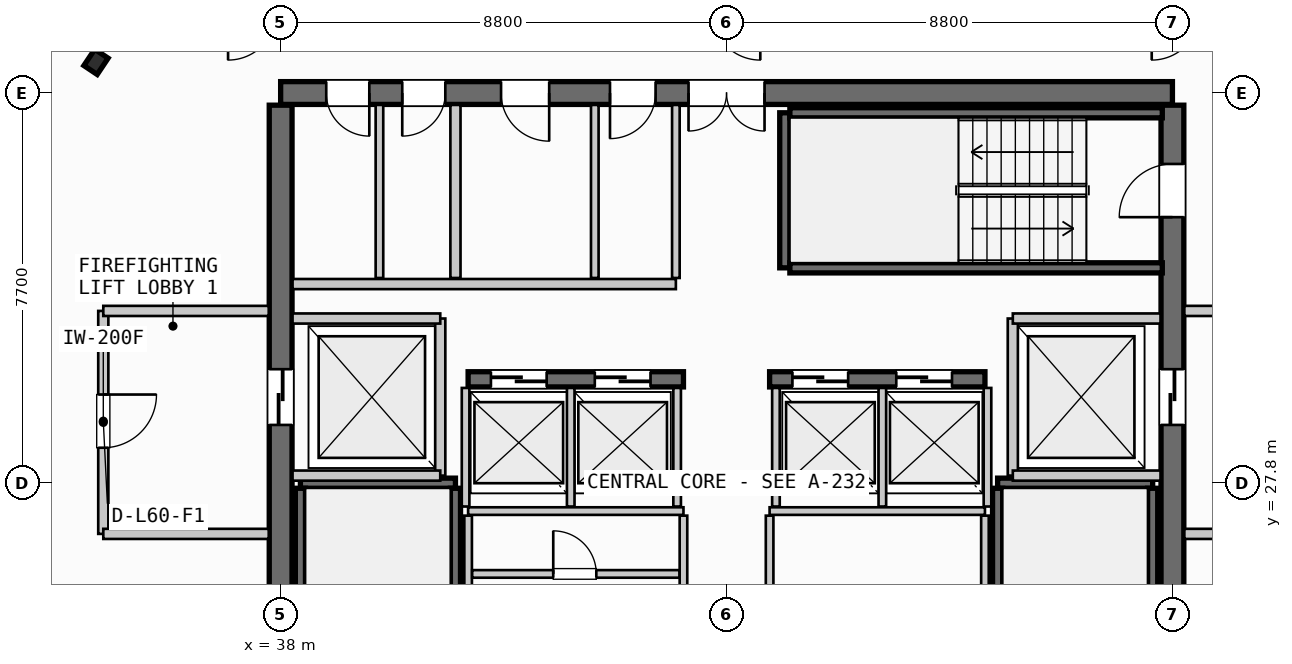
"""IFC4 building model, lengths in metres.
Left out: names, types, materials, properties, quantities, classifications, styles, units other than length and angle.
Written with IfcOpenShell. Run it as: python <this file> out.ifc"""

import sys

from ifc_helpers import new_model, si_unit, direction, frame, frame_2d, origin, origin_2d, place, context, subcontext, project, spatial, rectangle, i_section, extrude, source, transform, mapped, element, fill, save


model = new_model("IFC4")
c1 = context("Model", 3, precision=1e-05, world=origin(), true_north=direction((0.0, 1.0)))
c2 = subcontext(c1, "Body", "Model", "MODEL_VIEW")
j1 = project(units=[si_unit("LENGTHUNIT", "METRE"), si_unit("PLANEANGLEUNIT", "RADIAN")], contexts=[c1])
p1 = place(None, origin())
s1 = spatial("IfcSite", under=j1, at=p1, CompositionType="ELEMENT")
p2 = place(p1, origin())
s2 = spatial("IfcBuilding", under=s1, at=p2, CompositionType="ELEMENT")
p3 = place(p2, frame((0.0, 0.0, 231.85)))
s3 = spatial("IfcBuildingStorey", under=s2, at=p3, CompositionType="ELEMENT", Elevation=231.85)
p4 = place(p3, frame((55.6, 35.5, 0.0), z_axis=(0.0, 0.0, 1.0), x_axis=(-1.0, 0.0, 0.0)))
e1 = element("IfcWall", 1, at=p4, inside=s3, PredefinedType="SHEAR", context=c2, shape_type="SweptSolid", body=[
    extrude(rectangle(XDim=17.6, YDim=0.45, at=frame_2d((8.8, 0.0))), origin(), (0.0, 0.0, 1.0), 3.21),
])
p5 = place(p4, frame((8.05, 0.0, 0.0)))
e2 = element("IfcOpeningElement", 2, at=p5, cuts=e1, PredefinedType="OPENING", context=c2, shape_type="SweptSolid", body=[
    extrude(rectangle(XDim=1.5, YDim=2.2, at=frame_2d((0.75, 1.1))), frame((0.0, 0.235, 0.0), z_axis=(0.0, -1.0, 0.0), x_axis=(1.0, 0.0, 0.0)), (0.0, 0.0, 1.0), 0.47),
])
p6 = place(p4, frame((15.85, 0.0, 0.0)))
e3 = element("IfcOpeningElement", 3, at=p6, cuts=e1, PredefinedType="OPENING", context=c2, shape_type="SweptSolid", body=[
    extrude(rectangle(XDim=0.85, YDim=2.15, at=frame_2d((0.425, 1.075))), frame((0.0, 0.235, 0.0), z_axis=(0.0, -1.0, 0.0), x_axis=(1.0, 0.0, 0.0)), (0.0, 0.0, 1.0), 0.47),
])
p7 = place(p4, frame((14.35, 0.0, 0.0)))
e4 = element("IfcOpeningElement", 4, at=p7, cuts=e1, PredefinedType="OPENING", context=c2, shape_type="SweptSolid", body=[
    extrude(rectangle(XDim=0.85, YDim=2.15, at=frame_2d((0.425, 1.075))), frame((0.0, 0.235, 0.0), z_axis=(0.0, -1.0, 0.0), x_axis=(1.0, 0.0, 0.0)), (0.0, 0.0, 1.0), 0.47),
])
p8 = place(p4, frame((12.3, 0.0, 0.0)))
e5 = element("IfcOpeningElement", 5, at=p8, cuts=e1, PredefinedType="OPENING", context=c2, shape_type="SweptSolid", body=[
    extrude(rectangle(XDim=0.95, YDim=2.15, at=frame_2d((0.475, 1.075))), frame((0.0, 0.235, 0.0), z_axis=(0.0, -1.0, 0.0), x_axis=(1.0, 0.0, 0.0)), (0.0, 0.0, 1.0), 0.47),
])
p9 = place(p4, frame((10.2, 0.0, 0.0)))
e6 = element("IfcOpeningElement", 6, at=p9, cuts=e1, PredefinedType="OPENING", context=c2, shape_type="SweptSolid", body=[
    extrude(rectangle(XDim=0.9, YDim=2.15, at=frame_2d((0.45, 1.075))), frame((0.0, 0.235, 0.0), z_axis=(0.0, -1.0, 0.0), x_axis=(1.0, 0.0, 0.0)), (0.0, 0.0, 1.0), 0.47),
])
p10 = place(p3, frame((38.0, 35.26, 0.0), z_axis=(0.0, 0.0, 1.0), x_axis=(0.0, -1.0, 0.0)))
e7 = element("IfcWall", 7, at=p10, inside=s3, PredefinedType="SHEAR", context=c2, shape_type="SweptSolid", body=[
    extrude(rectangle(XDim=14.92, YDim=0.45, at=frame_2d((7.46, 0.0))), origin(), (0.0, 0.0, 1.0), 3.21),
])
p11 = place(p10, frame((5.21, 0.0, 0.0)))
e8 = element("IfcOpeningElement", 8, at=p11, cuts=e7, PredefinedType="OPENING", context=c2, shape_type="SweptSolid", body=[
    extrude(rectangle(XDim=1.1, YDim=2.2, at=frame_2d((0.55, 1.1))), frame((0.0, 0.235, 0.0), z_axis=(0.0, -1.0, 0.0), x_axis=(1.0, 0.0, 0.0)), (0.0, 0.0, 1.0), 0.47),
])
p12 = place(p3, frame((55.6, 20.34, 0.0), z_axis=(0.0, 0.0, 1.0), x_axis=(0.0, 1.0, 0.0)))
e9 = element("IfcWall", 9, at=p12, inside=s3, PredefinedType="SHEAR", context=c2, shape_type="SweptSolid", body=[
    extrude(rectangle(XDim=14.92, YDim=0.45, at=frame_2d((7.46, 0.0))), origin(), (0.0, 0.0, 1.0), 3.21),
])
p13 = place(p12, frame((12.71, 0.0, 0.0)))
e10 = element("IfcOpeningElement", 10, at=p13, cuts=e9, PredefinedType="OPENING", context=c2, shape_type="SweptSolid", body=[
    extrude(rectangle(XDim=1.05, YDim=2.15, at=frame_2d((0.525, 1.075))), frame((0.0, 0.235, 0.0), z_axis=(0.0, -1.0, 0.0), x_axis=(1.0, 0.0, 0.0)), (0.0, 0.0, 1.0), 0.47),
])
p14 = place(p12, frame((8.61, 0.0, 0.0)))
e11 = element("IfcOpeningElement", 11, at=p14, cuts=e9, PredefinedType="OPENING", context=c2, shape_type="SweptSolid", body=[
    extrude(rectangle(XDim=1.1, YDim=2.2, at=frame_2d((0.55, 1.1))), frame((0.0, 0.235, 0.0), z_axis=(0.0, -1.0, 0.0), x_axis=(1.0, 0.0, 0.0)), (0.0, 0.0, 1.0), 0.47),
])
p15 = place(p3, frame((41.7, 29.85, 0.0), z_axis=(0.0, 0.0, 1.0), x_axis=(1.0, 0.0, 0.0)))
e12 = element("IfcWall", 12, at=p15, inside=s3, PredefinedType="SHEAR", context=c2, shape_type="SweptSolid", body=[
    extrude(rectangle(XDim=4.25, YDim=0.3, at=frame_2d((2.125, 0.0))), origin(), (0.0, 0.0, 1.0), 3.21),
])
p16 = place(p15, frame((0.45, 0.0, 0.0)))
e13 = element("IfcOpeningElement", 13, at=p16, cuts=e12, PredefinedType="OPENING", context=c2, shape_type="SweptSolid", body=[
    extrude(rectangle(XDim=1.1, YDim=2.2, at=frame_2d((0.55, 1.1))), frame((0.0, 0.16, 0.0), z_axis=(0.0, -1.0, 0.0), x_axis=(1.0, 0.0, 0.0)), (0.0, 0.0, 1.0), 0.32),
])
p17 = place(p15, frame((2.5, 0.0, 0.0)))
e14 = element("IfcOpeningElement", 14, at=p17, cuts=e12, PredefinedType="OPENING", context=c2, shape_type="SweptSolid", body=[
    extrude(rectangle(XDim=1.1, YDim=2.2, at=frame_2d((0.55, 1.1))), frame((0.0, 0.16, 0.0), z_axis=(0.0, -1.0, 0.0), x_axis=(1.0, 0.0, 0.0)), (0.0, 0.0, 1.0), 0.32),
])
p18 = place(p3, frame((47.65, 29.85, 0.0), z_axis=(0.0, 0.0, 1.0), x_axis=(1.0, 0.0, 0.0)))
e15 = element("IfcWall", 15, at=p18, inside=s3, PredefinedType="SHEAR", context=c2, shape_type="SweptSolid", body=[
    extrude(rectangle(XDim=4.25, YDim=0.3, at=frame_2d((2.125, 0.0))), origin(), (0.0, 0.0, 1.0), 3.21),
])
p19 = place(p18, frame((0.45, 0.0, 0.0)))
e16 = element("IfcOpeningElement", 16, at=p19, cuts=e15, PredefinedType="OPENING", context=c2, shape_type="SweptSolid", body=[
    extrude(rectangle(XDim=1.1, YDim=2.2, at=frame_2d((0.55, 1.1))), frame((0.0, 0.16, 0.0), z_axis=(0.0, -1.0, 0.0), x_axis=(1.0, 0.0, 0.0)), (0.0, 0.0, 1.0), 0.32),
])
p20 = place(p18, frame((2.5, 0.0, 0.0)))
e17 = element("IfcOpeningElement", 17, at=p20, cuts=e15, PredefinedType="OPENING", context=c2, shape_type="SweptSolid", body=[
    extrude(rectangle(XDim=1.1, YDim=2.2, at=frame_2d((0.55, 1.1))), frame((0.0, 0.16, 0.0), z_axis=(0.0, -1.0, 0.0), x_axis=(1.0, 0.0, 0.0)), (0.0, 0.0, 1.0), 0.32),
])
m1 = source(origin(), c2, "Body", "SweptSolid", [
    extrude(i_section(OverallWidth=0.387, OverallDepth=0.316, WebThickness=0.019, FlangeThickness=0.028, FilletRadius=0.015, at=origin_2d()), origin(), (0.0, 0.0, 1.0), 3.21),
])
p21 = place(p3, frame((34.356, 36.115, 0.0), z_axis=(0.0, 0.0, 1.0), x_axis=(-0.831469612303, 0.55557023302, 0.0)))
e18 = element("IfcColumn", 18, at=p21, inside=s3, PredefinedType="COLUMN", context=c2, shape_type="MappedRepresentation", body=[
    mapped(m1, transform((0.0, 0.0, 0.0), scale=1.0)),
])
p22 = place(p3, frame((38.39, 27.8, 0.0), z_axis=(0.0, 0.0, 1.0), x_axis=(1.0, 0.0, 0.0)))
e19 = element("IfcWall", 19, at=p22, inside=s3, PredefinedType="SHEAR", context=c2, shape_type="SweptSolid", body=[
    extrude(rectangle(XDim=3.06, YDim=0.2, at=frame_2d((1.53, 0.0))), origin(), (0.0, 0.0, 1.0), 3.21),
])
for number, where, z_axis, x_axis in (
    (20, (41.45, 27.7, 0.0), (0.0, 0.0, 1.0), (0.0, -1.0, 0.0)),
    (21, (38.39, 20.35, 0.0), (0.0, 0.0, 1.0), (0.0, 1.0, 0.0)),
):
    element("IfcWall", number, at=place(p3, frame(where, z_axis=z_axis, x_axis=x_axis)), inside=s3, PredefinedType="SHEAR", context=c2, shape_type="SweptSolid", body=[
        extrude(rectangle(XDim=7.35, YDim=0.2, at=frame_2d((3.675, 0.0))), origin(), (0.0, 0.0, 1.0), 3.21),
    ])
p23 = place(p3, frame((52.15, 27.8, 0.0), z_axis=(0.0, 0.0, 1.0), x_axis=(1.0, 0.0, 0.0)))
e22 = element("IfcWall", 22, at=p23, inside=s3, PredefinedType="SHEAR", context=c2, shape_type="SweptSolid", body=[
    extrude(rectangle(XDim=3.06, YDim=0.2, at=frame_2d((1.53, 0.0))), origin(), (0.0, 0.0, 1.0), 3.21),
])
for number, where, z_axis, x_axis in (
    (23, (55.21, 27.7, 0.0), (0.0, 0.0, 1.0), (0.0, -1.0, 0.0)),
    (24, (52.15, 20.35, 0.0), (0.0, 0.0, 1.0), (0.0, 1.0, 0.0)),
):
    element("IfcWall", number, at=place(p3, frame(where, z_axis=z_axis, x_axis=x_axis)), inside=s3, PredefinedType="SHEAR", context=c2, shape_type="SweptSolid", body=[
        extrude(rectangle(XDim=7.35, YDim=0.2, at=frame_2d((3.675, 0.0))), origin(), (0.0, 0.0, 1.0), 3.21),
    ])
p24 = place(p3, frame((47.95, 32.05, 0.0), z_axis=(0.0, 0.0, 1.0), x_axis=(0.0, 1.0, 0.0)))
e25 = element("IfcWall", 25, at=p24, inside=s3, PredefinedType="SHEAR", context=c2, shape_type="SweptSolid", body=[
    extrude(rectangle(XDim=3.06, YDim=0.2, at=frame_2d((1.53, 0.0))), origin(), (0.0, 0.0, 1.0), 3.21),
])
for number, where, z_axis, x_axis in (
    (26, (48.05, 35.11, 0.0), (0.0, 0.0, 1.0), (1.0, 0.0, 0.0)),
    (27, (55.4, 32.05, 0.0), (0.0, 0.0, 1.0), (-1.0, 0.0, 0.0)),
):
    element("IfcWall", number, at=place(p3, frame(where, z_axis=z_axis, x_axis=x_axis)), inside=s3, PredefinedType="SHEAR", context=c2, shape_type="SweptSolid", body=[
        extrude(rectangle(XDim=7.35, YDim=0.2, at=frame_2d((3.675, 0.0))), origin(), (0.0, 0.0, 1.0), 3.21),
    ])
p25 = place(p3, frame((41.15, 27.95, 0.0), z_axis=(0.0, 0.0, 1.0), x_axis=(0.0, 1.0, 0.0)))
e28 = element("IfcWall", 28, at=p25, inside=s3, PredefinedType="PARTITIONING", context=c2, shape_type="SweptSolid", body=[
    extrude(rectangle(XDim=3.1, YDim=0.2, at=frame_2d((1.55, 0.0))), origin(), (0.0, 0.0, 1.0), 2.28),
])
for number, where, z_axis, x_axis in (
    (29, (38.235, 27.95, 0.0), (0.0, 0.0, 1.0), (1.0, 0.0, 0.0)),
    (30, (38.235, 31.05, 0.0), (0.0, 0.0, 1.0), (1.0, 0.0, 0.0)),
):
    element("IfcWall", number, at=place(p3, frame(where, z_axis=z_axis, x_axis=x_axis)), inside=s3, PredefinedType="PARTITIONING", context=c2, shape_type="SweptSolid", body=[
        extrude(rectangle(XDim=2.915, YDim=0.2, at=frame_2d((1.458, 0.0))), origin(), (0.0, 0.0, 1.0), 2.28),
    ])
p26 = place(p3, frame((34.5, 31.2, 0.0), z_axis=(0.0, 0.0, 1.0), x_axis=(0.0, -1.0, 0.0)))
e31 = element("IfcWall", 31, at=p26, inside=s3, PredefinedType="PARTITIONING", context=c2, shape_type="SweptSolid", body=[
    extrude(rectangle(XDim=4.4, YDim=0.2, at=frame_2d((2.2, 0.0))), origin(), (0.0, 0.0, 1.0), 2.28),
])
p27 = place(p26, frame((1.65, 0.0, 0.0)))
e32 = element("IfcOpeningElement", 32, at=p27, cuts=e31, PredefinedType="OPENING", context=c2, shape_type="SweptSolid", body=[
    extrude(rectangle(XDim=1.05, YDim=2.15, at=frame_2d((0.525, 1.075))), frame((0.0, 0.11, 0.0), z_axis=(0.0, -1.0, 0.0), x_axis=(1.0, 0.0, 0.0)), (0.0, 0.0, 1.0), 0.22),
])
for number, where, z_axis, x_axis in (
    (33, (34.5, 26.8, 0.0), (0.0, 0.0, 1.0), (1.0, 0.0, 0.0)),
    (34, (34.5, 31.2, 0.0), (0.0, 0.0, 1.0), (1.0, 0.0, 0.0)),
):
    element("IfcWall", number, at=place(p3, frame(where, z_axis=z_axis, x_axis=x_axis)), inside=s3, PredefinedType="PARTITIONING", context=c2, shape_type="SweptSolid", body=[
        extrude(rectangle(XDim=3.265, YDim=0.2, at=frame_2d((1.632, 0.0))), origin(), (0.0, 0.0, 1.0), 2.28),
    ])
p28 = place(p3, frame((52.45, 27.95, 0.0), z_axis=(0.0, 0.0, 1.0), x_axis=(0.0, 1.0, 0.0)))
e35 = element("IfcWall", 35, at=p28, inside=s3, PredefinedType="PARTITIONING", context=c2, shape_type="SweptSolid", body=[
    extrude(rectangle(XDim=3.1, YDim=0.2, at=frame_2d((1.55, 0.0))), origin(), (0.0, 0.0, 1.0), 2.28),
])
for number, where, z_axis, x_axis in (
    (36, (52.45, 27.95, 0.0), (0.0, 0.0, 1.0), (1.0, 0.0, 0.0)),
    (37, (52.45, 31.05, 0.0), (0.0, 0.0, 1.0), (1.0, 0.0, 0.0)),
):
    element("IfcWall", number, at=place(p3, frame(where, z_axis=z_axis, x_axis=x_axis)), inside=s3, PredefinedType="PARTITIONING", context=c2, shape_type="SweptSolid", body=[
        extrude(rectangle(XDim=2.915, YDim=0.2, at=frame_2d((1.458, 0.0))), origin(), (0.0, 0.0, 1.0), 2.28),
    ])
for number, where, z_axis, x_axis in (
    (38, (55.835, 26.8, 0.0), (0.0, 0.0, 1.0), (1.0, 0.0, 0.0)),
    (39, (55.835, 31.2, 0.0), (0.0, 0.0, 1.0), (1.0, 0.0, 0.0)),
):
    element("IfcWall", number, at=place(p3, frame(where, z_axis=z_axis, x_axis=x_axis)), inside=s3, PredefinedType="PARTITIONING", context=c2, shape_type="SweptSolid", body=[
        extrude(rectangle(XDim=3.265, YDim=0.2, at=frame_2d((1.633, 0.0))), origin(), (0.0, 0.0, 1.0), 2.28),
    ])
for number, where, z_axis, x_axis in (
    (40, (41.7, 27.25, 0.0), (0.0, 0.0, 1.0), (1.0, 0.0, 0.0)),
    (41, (47.65, 27.25, 0.0), (0.0, 0.0, 1.0), (1.0, 0.0, 0.0)),
):
    element("IfcWall", number, at=place(p3, frame(where, z_axis=z_axis, x_axis=x_axis)), inside=s3, PredefinedType="PARTITIONING", context=c2, shape_type="SweptSolid", body=[
        extrude(rectangle(XDim=4.25, YDim=0.15, at=frame_2d((2.125, 0.0))), origin(), (0.0, 0.0, 1.0), 2.28),
    ])
for number, where, z_axis, x_axis in (
    (42, (41.7, 24.92, 0.0), (0.0, 0.0, 1.0), (0.0, 1.0, 0.0)),
    (43, (45.95, 24.92, 0.0), (0.0, 0.0, 1.0), (0.0, 1.0, 0.0)),
    (44, (47.65, 24.92, 0.0), (0.0, 0.0, 1.0), (0.0, 1.0, 0.0)),
    (45, (51.9, 24.92, 0.0), (0.0, 0.0, 1.0), (0.0, 1.0, 0.0)),
):
    element("IfcWall", number, at=place(p3, frame(where, z_axis=z_axis, x_axis=x_axis)), inside=s3, PredefinedType="PARTITIONING", context=c2, shape_type="SweptSolid", body=[
        extrude(rectangle(XDim=2.24, YDim=0.15, at=frame_2d((1.12, 0.0))), origin(), (0.0, 0.0, 1.0), 2.28),
    ])
p29 = place(p3, frame((41.78, 26.01, 0.0), z_axis=(0.0, 0.0, 1.0), x_axis=(1.0, 0.0, 0.0)))
e46 = element("IfcWall", 46, at=p29, inside=s3, PredefinedType="PARTITIONING", context=c2, shape_type="SweptSolid", body=[
    extrude(rectangle(XDim=4.09, YDim=0.15, at=frame_2d((2.045, 0.0))), origin(), (0.0, 0.0, 1.0), 2.28),
])
p30 = place(p29, frame((1.6, 0.0, 0.0)))
e47 = element("IfcOpeningElement", 47, at=p30, cuts=e46, PredefinedType="OPENING", context=c2, shape_type="SweptSolid", body=[
    extrude(rectangle(XDim=0.85, YDim=2.15, at=frame_2d((0.425, 1.075))), frame((0.0, 0.085, 0.0), z_axis=(0.0, -1.0, 0.0), x_axis=(1.0, 0.0, 0.0)), (0.0, 0.0, 1.0), 0.17),
])
for number, where, z_axis, x_axis in (
    (48, (41.65, 27.34, 0.0), (0.0, 0.0, 1.0), (0.0, 1.0, 0.0)),
    (49, (43.725, 27.34, 0.0), (0.0, 0.0, 1.0), (0.0, 1.0, 0.0)),
    (50, (45.825, 27.34, 0.0), (0.0, 0.0, 1.0), (0.0, 1.0, 0.0)),
    (51, (47.775, 27.34, 0.0), (0.0, 0.0, 1.0), (0.0, 1.0, 0.0)),
    (52, (49.875, 27.34, 0.0), (0.0, 0.0, 1.0), (0.0, 1.0, 0.0)),
    (53, (51.95, 27.34, 0.0), (0.0, 0.0, 1.0), (0.0, 1.0, 0.0)),
):
    element("IfcWall", number, at=place(p3, frame(where, z_axis=z_axis, x_axis=x_axis)), inside=s3, PredefinedType="PARTITIONING", context=c2, shape_type="SweptSolid", body=[
        extrude(rectangle(XDim=2.34, YDim=0.15, at=frame_2d((1.17, 0.0))), origin(), (0.0, 0.0, 1.0), 2.28),
    ])
p31 = place(p3, frame((41.45, 31.85, 0.0), z_axis=(0.0, 0.0, 1.0), x_axis=(0.0, 1.0, 0.0)))
e54 = element("IfcWall", 54, at=p31, inside=s3, PredefinedType="PARTITIONING", context=c2, shape_type="SweptSolid", body=[
    extrude(rectangle(XDim=3.415, YDim=0.2, at=frame_2d((1.708, 0.0))), origin(), (0.0, 0.0, 1.0), 2.28),
])
p32 = place(p3, frame((38.235, 31.73, 0.0), z_axis=(0.0, 0.0, 1.0), x_axis=(1.0, 0.0, 0.0)))
e55 = element("IfcWall", 55, at=p32, inside=s3, PredefinedType="PARTITIONING", context=c2, shape_type="SweptSolid", body=[
    extrude(rectangle(XDim=7.565, YDim=0.2, at=frame_2d((3.782, 0.0))), origin(), (0.0, 0.0, 1.0), 2.28),
])
for number, where, z_axis, x_axis in (
    (56, (45.8, 31.85, 0.0), (0.0, 0.0, 1.0), (0.0, 1.0, 0.0)),
    (57, (39.95, 31.85, 0.0), (0.0, 0.0, 1.0), (0.0, 1.0, 0.0)),
):
    element("IfcWall", number, at=place(p3, frame(where, z_axis=z_axis, x_axis=x_axis)), inside=s3, PredefinedType="PARTITIONING", context=c2, shape_type="SweptSolid", body=[
        extrude(rectangle(XDim=3.415, YDim=0.15, at=frame_2d((1.708, 0.0))), origin(), (0.0, 0.0, 1.0), 2.28),
    ])
p33 = place(p3, frame((44.2, 31.85, 0.0), z_axis=(0.0, 0.0, 1.0), x_axis=(0.0, 1.0, 0.0)))
e58 = element("IfcWall", 58, at=p33, inside=s3, PredefinedType="PLUMBINGWALL", context=c2, shape_type="SweptSolid", body=[
    extrude(rectangle(XDim=3.415, YDim=0.15, at=frame_2d((1.708, 0.0))), origin(), (0.0, 0.0, 1.0), 2.28),
])
m2 = source(origin(), c2, "Body", "SweptSolid", [
    extrude(rectangle(XDim=1.05, YDim=2.15, at=frame_2d((0.525, 1.075))), frame((0.0, 0.025, 0.0), z_axis=(0.0, -1.0, 0.0), x_axis=(1.0, 0.0, 0.0)), (0.0, 0.0, 1.0), 0.05),
])
p34 = place(p13, origin())
e59 = element("IfcDoor", 59, at=p34, inside=s3, OperationType="SINGLE_SWING_LEFT", PredefinedType="DOOR", context=c2, shape_type="MappedRepresentation", body=[
    mapped(m2, transform((0.0, 0.0, 0.0), scale=1.0)),
])
fill(e10, e59)
m3 = source(origin(), c2, "Body", "SweptSolid", [
    extrude(rectangle(XDim=1.5, YDim=2.2, at=frame_2d((0.75, 1.1))), frame((0.0, 0.025, 0.0), z_axis=(0.0, -1.0, 0.0), x_axis=(1.0, 0.0, 0.0)), (0.0, 0.0, 1.0), 0.05),
])
p35 = place(p5, origin())
e60 = element("IfcDoor", 60, at=p35, inside=s3, OperationType="DOUBLE_DOOR_SINGLE_SWING", PredefinedType="DOOR", context=c2, shape_type="MappedRepresentation", body=[
    mapped(m3, transform((0.0, 0.0, 0.0), scale=1.0)),
])
fill(e2, e60)
m4 = source(origin(), c2, "Body", "SweptSolid", [
    extrude(rectangle(XDim=1.1, YDim=2.2, at=frame_2d((0.55, 1.1))), frame((0.0, 0.025, 0.0), z_axis=(0.0, -1.0, 0.0), x_axis=(1.0, 0.0, 0.0)), (0.0, 0.0, 1.0), 0.05),
])
p36 = place(p11, origin())
e61 = element("IfcDoor", 61, at=p36, inside=s3, OperationType="SLIDING_TO_LEFT", PredefinedType="DOOR", context=c2, shape_type="MappedRepresentation", body=[
    mapped(m4, transform((0.0, 0.0, 0.0), scale=1.0)),
])
fill(e8, e61)
p37 = place(p14, origin())
e62 = element("IfcDoor", 62, at=p37, inside=s3, OperationType="SLIDING_TO_RIGHT", PredefinedType="DOOR", context=c2, shape_type="MappedRepresentation", body=[
    mapped(m4, transform((0.0, 0.0, 0.0), scale=1.0)),
])
fill(e11, e62)
p38 = place(p16, origin())
e63 = element("IfcDoor", 63, at=p38, inside=s3, OperationType="SLIDING_TO_LEFT", PredefinedType="DOOR", context=c2, shape_type="MappedRepresentation", body=[
    mapped(m4, transform((0.0, 0.0, 0.0), scale=1.0)),
])
fill(e13, e63)
p39 = place(p17, origin())
e64 = element("IfcDoor", 64, at=p39, inside=s3, OperationType="SLIDING_TO_LEFT", PredefinedType="DOOR", context=c2, shape_type="MappedRepresentation", body=[
    mapped(m4, transform((0.0, 0.0, 0.0), scale=1.0)),
])
fill(e14, e64)
p40 = place(p19, origin())
e65 = element("IfcDoor", 65, at=p40, inside=s3, OperationType="SLIDING_TO_LEFT", PredefinedType="DOOR", context=c2, shape_type="MappedRepresentation", body=[
    mapped(m4, transform((0.0, 0.0, 0.0), scale=1.0)),
])
fill(e16, e65)
p41 = place(p20, origin())
e66 = element("IfcDoor", 66, at=p41, inside=s3, OperationType="SLIDING_TO_LEFT", PredefinedType="DOOR", context=c2, shape_type="MappedRepresentation", body=[
    mapped(m4, transform((0.0, 0.0, 0.0), scale=1.0)),
])
fill(e17, e66)
m5 = source(origin(), c2, "Body", "SweptSolid", [
    extrude(rectangle(XDim=0.85, YDim=2.15, at=frame_2d((0.425, 1.075))), frame((0.0, 0.025, 0.0), z_axis=(0.0, -1.0, 0.0), x_axis=(1.0, 0.0, 0.0)), (0.0, 0.0, 1.0), 0.05),
])
p42 = place(p6, origin())
e67 = element("IfcDoor", 67, at=p42, inside=s3, OperationType="SINGLE_SWING_LEFT", PredefinedType="DOOR", context=c2, shape_type="MappedRepresentation", body=[
    mapped(m5, transform((0.0, 0.0, 0.0), scale=1.0)),
])
fill(e3, e67)
p43 = place(p7, origin())
e68 = element("IfcDoor", 68, at=p43, inside=s3, OperationType="SINGLE_SWING_RIGHT", PredefinedType="DOOR", context=c2, shape_type="MappedRepresentation", body=[
    mapped(m5, transform((0.0, 0.0, 0.0), scale=1.0)),
])
fill(e4, e68)
m6 = source(origin(), c2, "Body", "SweptSolid", [
    extrude(rectangle(XDim=0.95, YDim=2.15, at=frame_2d((0.475, 1.075))), frame((0.0, 0.025, 0.0), z_axis=(0.0, -1.0, 0.0), x_axis=(1.0, 0.0, 0.0)), (0.0, 0.0, 1.0), 0.05),
])
p44 = place(p8, origin())
e69 = element("IfcDoor", 69, at=p44, inside=s3, OperationType="SINGLE_SWING_LEFT", PredefinedType="DOOR", context=c2, shape_type="MappedRepresentation", body=[
    mapped(m6, transform((0.0, 0.0, 0.0), scale=1.0)),
])
fill(e5, e69)
m7 = source(origin(), c2, "Body", "SweptSolid", [
    extrude(rectangle(XDim=0.9, YDim=2.15, at=frame_2d((0.45, 1.075))), frame((0.0, 0.025, 0.0), z_axis=(0.0, -1.0, 0.0), x_axis=(1.0, 0.0, 0.0)), (0.0, 0.0, 1.0), 0.05),
])
p45 = place(p9, origin())
e70 = element("IfcDoor", 70, at=p45, inside=s3, OperationType="SINGLE_SWING_RIGHT", PredefinedType="DOOR", context=c2, shape_type="MappedRepresentation", body=[
    mapped(m7, transform((0.0, 0.0, 0.0), scale=1.0)),
])
fill(e6, e70)
p46 = place(p27, origin())
e71 = element("IfcDoor", 71, at=p46, inside=s3, OperationType="SINGLE_SWING_LEFT", PredefinedType="DOOR", context=c2, shape_type="MappedRepresentation", body=[
    mapped(m2, transform((0.0, 0.0, 0.0), scale=1.0)),
])
fill(e32, e71)
p47 = place(p30, origin())
e72 = element("IfcDoor", 72, at=p47, inside=s3, OperationType="SINGLE_SWING_LEFT", PredefinedType="DOOR", context=c2, shape_type="MappedRepresentation", body=[
    mapped(m5, transform((0.0, 0.0, 0.0), scale=1.0)),
])
fill(e47, e72)
save(model, sys.argv[1])
